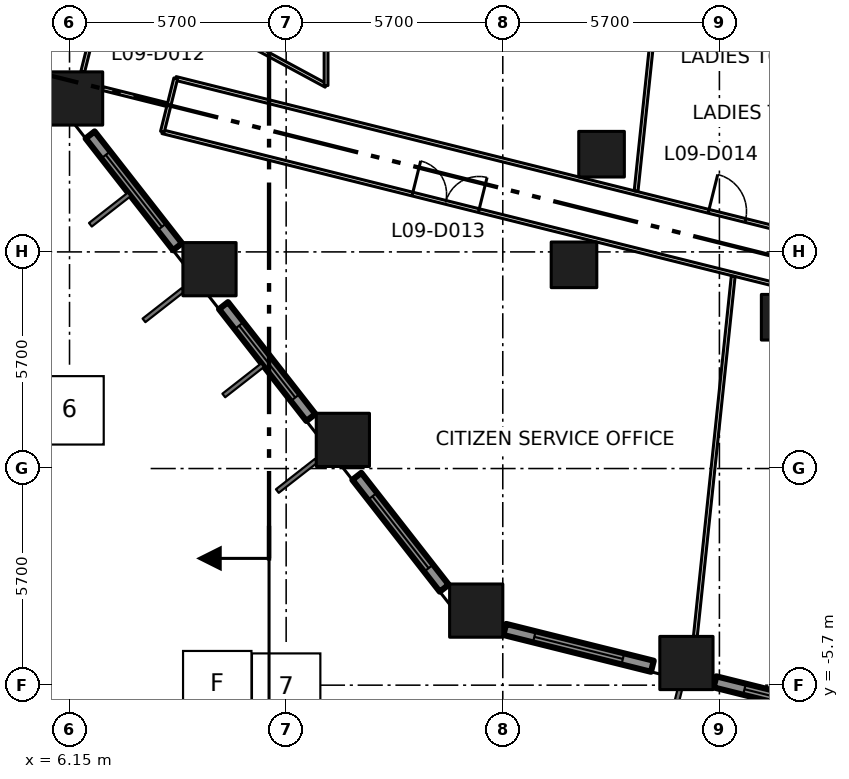
"""IFC4 building model, lengths in metres.
Left out: names, types, materials, properties, quantities, classifications, styles, units other than length and angle.
Written with IfcOpenShell. Run it as: python <this file> out.ifc"""

import sys

from ifc_helpers import new_model, si_unit, direction, frame, frame_2d, origin, origin_2d, place, context, subcontext, project, spatial, rectangle, extrude, element, fill, save


model = new_model("IFC4")
c1 = context("Model", 3, precision=1e-05, world=origin(), true_north=direction((0.0, 1.0)))
c2 = subcontext(c1, "Body", "Model", "MODEL_VIEW")
j1 = project(units=[si_unit("LENGTHUNIT", "METRE"), si_unit("PLANEANGLEUNIT", "RADIAN")], contexts=[c1])
p1 = place(None, origin())
s1 = spatial("IfcSite", under=j1, at=p1, CompositionType="ELEMENT")
p2 = place(p1, origin())
s2 = spatial("IfcBuilding", under=s1, at=p2, CompositionType="ELEMENT")
p3 = place(p2, frame((0.0, 0.0, 45.6)))
s3 = spatial("IfcBuildingStorey", under=s2, at=p3, CompositionType="ELEMENT", Elevation=45.6)
for number, where, z_axis, x_axis in (
    (1, (16.851, -3.738, 0.0), (0.0, 0.0, 1.0), (1.0, 0.0, 0.0)),
    (2, (13.342, 0.754, 0.0), (0.0, 0.0, 1.0), (1.0, 0.0, 0.0)),
    (3, (9.833, 5.245, 0.0), (0.0, 0.0, 1.0), (1.0, 0.0, 0.0)),
    (4, (6.323, 9.737, 0.0), (0.0, 0.0, 1.0), (1.0, 0.0, 0.0)),
    (5, (22.382, -5.117, 0.0), (0.0, 0.0, 1.0), (1.0, 0.0, 0.0)),
):
    element("IfcColumn", number, at=place(p3, frame(where, z_axis=z_axis, x_axis=x_axis)), inside=s3, PredefinedType="COLUMN", context=c2, shape_type="SweptSolid", body=[
        extrude(rectangle(XDim=1.4, YDim=1.4, at=origin_2d()), origin(), (0.0, 0.0, 1.0), 4.2),
    ])
for number, where, z_axis, x_axis in (
    (6, (19.424, 5.36, 0.0), (0.0, 0.0, 1.0), (1.0, 0.0, 0.0)),
    (7, (24.954, 3.981, 0.0), (0.0, 0.0, 1.0), (1.0, 0.0, 0.0)),
    (8, (20.149, 8.271, 0.0), (0.0, 0.0, 1.0), (1.0, 0.0, 0.0)),
):
    element("IfcColumn", number, at=place(p3, frame(where, z_axis=z_axis, x_axis=x_axis)), inside=s3, PredefinedType="COLUMN", context=c2, shape_type="SweptSolid", body=[
        extrude(rectangle(XDim=1.2, YDim=1.2, at=origin_2d()), origin(), (0.0, 0.0, 1.0), 4.2),
    ])
p4 = place(p3, frame((6.692, 8.778, 0.0), z_axis=(0.0, 0.0, 1.0), x_axis=(0.615767067156, -0.787928244833, 0.0)))
e9 = element("IfcWall", 9, at=p4, inside=s3, PredefinedType="SOLIDWALL", context=c2, shape_type="SweptSolid", body=[
    extrude(rectangle(XDim=3.735, YDim=0.3, at=frame_2d((1.868, 0.0))), origin(), (0.0, 0.0, 1.0), 3.1),
])
p5 = place(p4, frame((0.668, 0.0, 0.8)))
e10 = element("IfcOpeningElement", 10, at=p5, cuts=e9, PredefinedType="OPENING", context=c2, shape_type="SweptSolid", body=[
    extrude(rectangle(XDim=2.4, YDim=2.1, at=frame_2d((1.2, 1.05))), frame((0.0, 0.16, 0.0), z_axis=(0.0, -1.0, 0.0), x_axis=(1.0, 0.0, 0.0)), (0.0, 0.0, 1.0), 0.32),
])
p6 = place(p3, frame((10.202, 4.286, 0.0), z_axis=(0.0, 0.0, 1.0), x_axis=(0.615636430057, -0.788030320474, 0.0)))
e11 = element("IfcWall", 11, at=p6, inside=s3, PredefinedType="SOLIDWALL", context=c2, shape_type="SweptSolid", body=[
    extrude(rectangle(XDim=3.734, YDim=0.3, at=frame_2d((1.867, 0.0))), origin(), (0.0, 0.0, 1.0), 3.1),
])
p7 = place(p6, frame((0.667, 0.0, 0.8)))
e12 = element("IfcOpeningElement", 12, at=p7, cuts=e11, PredefinedType="OPENING", context=c2, shape_type="SweptSolid", body=[
    extrude(rectangle(XDim=2.4, YDim=2.1, at=frame_2d((1.2, 1.05))), frame((0.0, 0.16, 0.0), z_axis=(0.0, -1.0, 0.0), x_axis=(1.0, 0.0, 0.0)), (0.0, 0.0, 1.0), 0.32),
])
p8 = place(p3, frame((13.71, -0.205, 0.0), z_axis=(0.0, 0.0, 1.0), x_axis=(0.615798780214, -0.787903460004, 0.0)))
e13 = element("IfcWall", 13, at=p8, inside=s3, PredefinedType="SOLIDWALL", context=c2, shape_type="SweptSolid", body=[
    extrude(rectangle(XDim=3.735, YDim=0.3, at=frame_2d((1.868, 0.0))), origin(), (0.0, 0.0, 1.0), 3.1),
])
p9 = place(p8, frame((0.667, 0.0, 0.8)))
e14 = element("IfcOpeningElement", 14, at=p9, cuts=e13, PredefinedType="OPENING", context=c2, shape_type="SweptSolid", body=[
    extrude(rectangle(XDim=2.4, YDim=2.1, at=frame_2d((1.2, 1.05))), frame((0.0, 0.16, 0.0), z_axis=(0.0, -1.0, 0.0), x_axis=(1.0, 0.0, 0.0)), (0.0, 0.0, 1.0), 0.32),
])
p10 = place(p3, frame((17.602, -4.234, 0.0), z_axis=(0.0, 0.0, 1.0), x_axis=(0.970260773365, -0.242062040951, 0.0)))
e15 = element("IfcWall", 15, at=p10, inside=s3, PredefinedType="SOLIDWALL", context=c2, shape_type="SweptSolid", body=[
    extrude(rectangle(XDim=4.003, YDim=0.3, at=frame_2d((2.001, 0.0))), origin(), (0.0, 0.0, 1.0), 3.1),
])
p11 = place(p10, frame((0.802, 0.0, 0.8)))
e16 = element("IfcOpeningElement", 16, at=p11, cuts=e15, PredefinedType="OPENING", context=c2, shape_type="SweptSolid", body=[
    extrude(rectangle(XDim=2.4, YDim=2.1, at=frame_2d((1.2, 1.05))), frame((0.0, 0.16, 0.0), z_axis=(0.0, -1.0, 0.0), x_axis=(1.0, 0.0, 0.0)), (0.0, 0.0, 1.0), 0.32),
])
p12 = place(p3, frame((23.133, -5.613, 0.0), z_axis=(0.0, 0.0, 1.0), x_axis=(0.970303772127, -0.241889623168, 0.0)))
e17 = element("IfcWall", 17, at=p12, inside=s3, PredefinedType="SOLIDWALL", context=c2, shape_type="SweptSolid", body=[
    extrude(rectangle(XDim=4.002, YDim=0.3, at=frame_2d((2.001, 0.0))), origin(), (0.0, 0.0, 1.0), 3.1),
])
p13 = place(p12, frame((0.801, 0.0, 0.8)))
e18 = element("IfcOpeningElement", 18, at=p13, cuts=e17, PredefinedType="OPENING", context=c2, shape_type="SweptSolid", body=[
    extrude(rectangle(XDim=2.4, YDim=2.1, at=frame_2d((1.2, 1.05))), frame((0.0, 0.16, 0.0), z_axis=(0.0, -1.0, 0.0), x_axis=(1.0, 0.0, 0.0)), (0.0, 0.0, 1.0), 0.32),
])
p14 = place(p3, frame((8.594, 8.862, 0.0), z_axis=(0.0, 0.0, 1.0), x_axis=(0.970292243361, -0.241935864379, 0.0)))
e19 = element("IfcWall", 19, at=p14, inside=s3, PredefinedType="PARTITIONING", context=c2, shape_type="SweptSolid", body=[
    extrude(rectangle(XDim=68.775, YDim=0.1, at=frame_2d((34.388, 0.0))), origin(), (0.0, 0.0, 1.0), 3.9),
])
p15 = place(p14, frame((36.265, 0.0, 0.0)))
e20 = element("IfcOpeningElement", 20, at=p15, cuts=e19, PredefinedType="OPENING", context=c2, shape_type="SweptSolid", body=[
    extrude(rectangle(XDim=1.8, YDim=2.1, at=frame_2d((0.9, 1.05))), frame((0.0, 0.06, 0.0), z_axis=(0.0, -1.0, 0.0), x_axis=(1.0, 0.0, 0.0)), (0.0, 0.0, 1.0), 0.12),
])
p16 = place(p14, frame((48.365, 0.0, 0.0)))
e21 = element("IfcOpeningElement", 21, at=p16, cuts=e19, PredefinedType="OPENING", context=c2, shape_type="SweptSolid", body=[
    extrude(rectangle(XDim=1.8, YDim=2.1, at=frame_2d((0.9, 1.05))), frame((0.0, 0.06, 0.0), z_axis=(0.0, -1.0, 0.0), x_axis=(1.0, 0.0, 0.0)), (0.0, 0.0, 1.0), 0.12),
])
p17 = place(p14, frame((19.565, 0.0, 0.0)))
e22 = element("IfcOpeningElement", 22, at=p17, cuts=e19, PredefinedType="OPENING", context=c2, shape_type="SweptSolid", body=[
    extrude(rectangle(XDim=1.0, YDim=2.1, at=frame_2d((0.5, 1.05))), frame((0.0, 0.06, 0.0), z_axis=(0.0, -1.0, 0.0), x_axis=(1.0, 0.0, 0.0)), (0.0, 0.0, 1.0), 0.12),
])
p18 = place(p14, frame((24.165, 0.0, 0.0)))
e23 = element("IfcOpeningElement", 23, at=p18, cuts=e19, PredefinedType="OPENING", context=c2, shape_type="SweptSolid", body=[
    extrude(rectangle(XDim=1.8, YDim=2.1, at=frame_2d((0.9, 1.05))), frame((0.0, 0.06, 0.0), z_axis=(0.0, -1.0, 0.0), x_axis=(1.0, 0.0, 0.0)), (0.0, 0.0, 1.0), 0.12),
])
p19 = place(p14, frame((6.78, 0.0, 0.0)))
e24 = element("IfcOpeningElement", 24, at=p19, cuts=e19, PredefinedType="OPENING", context=c2, shape_type="SweptSolid", body=[
    extrude(rectangle(XDim=1.8, YDim=2.1, at=frame_2d((0.9, 1.05))), frame((0.0, 0.06, 0.0), z_axis=(0.0, -1.0, 0.0), x_axis=(1.0, 0.0, 0.0)), (0.0, 0.0, 1.0), 0.12),
])
p20 = place(p3, frame((8.944, 10.264, 0.0), z_axis=(0.0, 0.0, 1.0), x_axis=(0.970300504447, -0.241902730595, 0.0)))
e25 = element("IfcWall", 25, at=p20, inside=s3, PredefinedType="PARTITIONING", context=c2, shape_type="SweptSolid", body=[
    extrude(rectangle(XDim=19.879, YDim=0.1, at=frame_2d((9.939, 0.0))), origin(), (0.0, 0.0, 1.0), 3.9),
])
p21 = place(p20, frame((14.45, 0.0, 0.0)))
e26 = element("IfcOpeningElement", 26, at=p21, cuts=e25, PredefinedType="OPENING", context=c2, shape_type="SweptSolid", body=[
    extrude(rectangle(XDim=1.0, YDim=2.1, at=frame_2d((0.5, 1.05))), frame((0.0, 0.06, 0.0), z_axis=(0.0, -1.0, 0.0), x_axis=(1.0, 0.0, 0.0)), (0.0, 0.0, 1.0), 0.12),
])
p22 = place(p3, frame((8.944, 10.264, 0.0), z_axis=(0.0, 0.0, 1.0), x_axis=(-0.242297077633, -0.970202105837, 0.0)))
e27 = element("IfcWall", 27, at=p22, inside=s3, PredefinedType="PARTITIONING", context=c2, shape_type="SweptSolid", body=[
    extrude(rectangle(XDim=1.445, YDim=0.1, at=frame_2d((0.722, 0.0))), origin(), (0.0, 0.0, 1.0), 3.9),
])
p23 = place(p3, frame((9.9, 11.7, 0.0), z_axis=(0.0, 0.0, 1.0), x_axis=(0.87965147249, -0.475618846291, 0.0)))
e28 = element("IfcWall", 28, at=p23, inside=s3, PredefinedType="PARTITIONING", context=c2, shape_type="SweptSolid", body=[
    extrude(rectangle(XDim=3.41, YDim=0.1, at=frame_2d((1.705, 0.0))), origin(), (0.0, 0.0, 1.0), 3.9),
])
p24 = place(p3, frame((12.9, 10.078, 0.0), z_axis=(0.0, 0.0, 1.0), x_axis=(0.0, 1.0, 0.0)))
e29 = element("IfcWall", 29, at=p24, inside=s3, PredefinedType="PARTITIONING", context=c2, shape_type="SweptSolid", body=[
    extrude(rectangle(XDim=4.022, YDim=0.1, at=frame_2d((2.011, 0.0))), origin(), (0.0, 0.0, 1.0), 3.9),
])
p25 = place(p3, frame((6.797, 11.638, 0.0), z_axis=(0.0, 0.0, 1.0), x_axis=(-0.242396400943, -0.970177295555, 0.0)))
e30 = element("IfcWall", 30, at=p25, inside=s3, PredefinedType="PARTITIONING", context=c2, shape_type="SweptSolid", body=[
    extrude(rectangle(XDim=1.238, YDim=0.1, at=frame_2d((0.619, 0.0))), origin(), (0.0, 0.0, 1.0), 3.9),
])
p26 = place(p3, frame((8.72, 9.574, 0.0), z_axis=(0.0, 0.0, 1.0), x_axis=(-0.97016712555, 0.242437102155, 0.0)))
e31 = element("IfcWall", 31, at=p26, inside=s3, PredefinedType="PARTITIONING", context=c2, shape_type="SweptSolid", body=[
    extrude(rectangle(XDim=1.749, YDim=0.1, at=frame_2d((0.875, 0.0))), origin(), (0.0, 0.0, 1.0), 3.9),
])
p27 = place(p3, frame((21.058, 7.302, 0.0), z_axis=(0.0, 0.0, 1.0), x_axis=(0.10457695042, 0.994516797968, 0.0)))
e32 = element("IfcWall", 32, at=p27, inside=s3, PredefinedType="PARTITIONING", context=c2, shape_type="SweptSolid", body=[
    extrude(rectangle(XDim=6.836, YDim=0.1, at=frame_2d((3.418, 0.0))), origin(), (0.0, 0.0, 1.0), 3.9),
])
p28 = place(p3, frame((22.617, -4.417, 0.0), z_axis=(0.0, 0.0, 1.0), x_axis=(0.10455139139, 0.994519485258, 0.0)))
e33 = element("IfcWall", 33, at=p28, inside=s3, PredefinedType="PARTITIONING", context=c2, shape_type="SweptSolid", body=[
    extrude(rectangle(XDim=9.527, YDim=0.1, at=frame_2d((4.764, 0.0))), origin(), (0.0, 0.0, 1.0), 3.9),
])
p29 = place(p5, origin())
e34 = element("IfcWindow", 34, at=p29, inside=s3, PartitioningType="DOUBLE_PANEL_VERTICAL", PredefinedType="WINDOW", context=c2, shape_type="SweptSolid", body=[
    extrude(rectangle(XDim=2.4, YDim=2.1, at=frame_2d((1.2, 1.05))), frame((0.0, 0.03, 0.0), z_axis=(0.0, -1.0, 0.0), x_axis=(1.0, 0.0, 0.0)), (0.0, 0.0, 1.0), 0.06),
])
fill(e10, e34)
p30 = place(p7, origin())
e35 = element("IfcWindow", 35, at=p30, inside=s3, PartitioningType="DOUBLE_PANEL_VERTICAL", PredefinedType="WINDOW", context=c2, shape_type="SweptSolid", body=[
    extrude(rectangle(XDim=2.4, YDim=2.1, at=frame_2d((1.2, 1.05))), frame((0.0, 0.03, 0.0), z_axis=(0.0, -1.0, 0.0), x_axis=(1.0, 0.0, 0.0)), (0.0, 0.0, 1.0), 0.06),
])
fill(e12, e35)
p31 = place(p9, origin())
e36 = element("IfcWindow", 36, at=p31, inside=s3, PartitioningType="DOUBLE_PANEL_VERTICAL", PredefinedType="WINDOW", context=c2, shape_type="SweptSolid", body=[
    extrude(rectangle(XDim=2.4, YDim=2.1, at=frame_2d((1.2, 1.05))), frame((0.0, 0.03, 0.0), z_axis=(0.0, -1.0, 0.0), x_axis=(1.0, 0.0, 0.0)), (0.0, 0.0, 1.0), 0.06),
])
fill(e14, e36)
p32 = place(p11, origin())
e37 = element("IfcWindow", 37, at=p32, inside=s3, PartitioningType="DOUBLE_PANEL_VERTICAL", PredefinedType="WINDOW", context=c2, shape_type="SweptSolid", body=[
    extrude(rectangle(XDim=2.4, YDim=2.1, at=frame_2d((1.2, 1.05))), frame((0.0, 0.03, 0.0), z_axis=(0.0, -1.0, 0.0), x_axis=(1.0, 0.0, 0.0)), (0.0, 0.0, 1.0), 0.06),
])
fill(e16, e37)
p33 = place(p13, origin())
e38 = element("IfcWindow", 38, at=p33, inside=s3, PartitioningType="DOUBLE_PANEL_VERTICAL", PredefinedType="WINDOW", context=c2, shape_type="SweptSolid", body=[
    extrude(rectangle(XDim=2.4, YDim=2.1, at=frame_2d((1.2, 1.05))), frame((0.0, 0.03, 0.0), z_axis=(0.0, -1.0, 0.0), x_axis=(1.0, 0.0, 0.0)), (0.0, 0.0, 1.0), 0.06),
])
fill(e18, e38)
p34 = place(p19, origin())
e39 = element("IfcDoor", 39, at=p34, inside=s3, OperationType="DOUBLE_DOOR_SINGLE_SWING", PredefinedType="DOOR", context=c2, shape_type="SweptSolid", body=[
    extrude(rectangle(XDim=1.8, YDim=2.1, at=frame_2d((0.9, 1.05))), frame((0.0, 0.025, 0.0), z_axis=(0.0, -1.0, 0.0), x_axis=(1.0, 0.0, 0.0)), (0.0, 0.0, 1.0), 0.05),
])
fill(e24, e39)
p35 = place(p21, origin())
e40 = element("IfcDoor", 40, at=p35, inside=s3, OperationType="SINGLE_SWING_LEFT", PredefinedType="DOOR", context=c2, shape_type="SweptSolid", body=[
    extrude(rectangle(XDim=1.0, YDim=2.1, at=frame_2d((0.5, 1.05))), frame((0.0, 0.025, 0.0), z_axis=(0.0, -1.0, 0.0), x_axis=(1.0, 0.0, 0.0)), (0.0, 0.0, 1.0), 0.05),
])
fill(e26, e40)
save(model, sys.argv[1])
